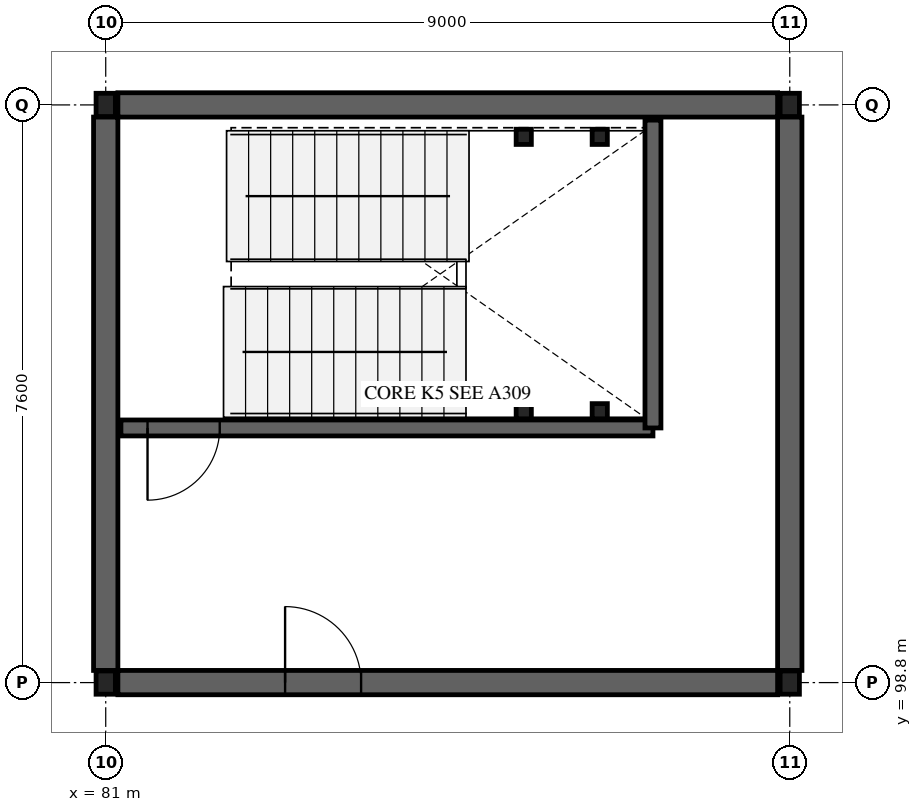
"""IFC4 building model, lengths in metres.
Left out: names, types, materials, properties, quantities, classifications, styles, units other than length and angle.
Written with IfcOpenShell. Run it as: python <this file> out.ifc"""

import sys

from ifc_helpers import new_model, si_unit, direction, frame, frame_2d, origin, origin_2d, place, context, subcontext, project, spatial, rectangle, hollow_rectangle, i_section, extrude, element, fill, save


model = new_model("IFC4")
c1 = context("Model", 3, precision=1e-05, world=origin(), true_north=direction((0.0, 1.0)))
c2 = subcontext(c1, "Body", "Model", "MODEL_VIEW")
j1 = project(units=[si_unit("LENGTHUNIT", "METRE"), si_unit("PLANEANGLEUNIT", "RADIAN")], contexts=[c1])
p1 = place(None, origin())
s1 = spatial("IfcSite", under=j1, at=p1, CompositionType="ELEMENT")
p2 = place(p1, origin())
s2 = spatial("IfcBuilding", under=s1, at=p2, CompositionType="ELEMENT")
p3 = place(p2, frame((0.0, 0.0, 5.04)))
s3 = spatial("IfcBuildingStorey", under=s2, at=p3, CompositionType="ELEMENT", Elevation=5.04)
for number, where, z_axis, x_axis in (
    (1, (81.0, 98.8, 0.0), (0.0, 0.0, 1.0), (1.0, 0.0, 0.0)),
    (2, (81.0, 106.4, 0.0), (0.0, 0.0, 1.0), (1.0, 0.0, 0.0)),
    (3, (90.0, 98.8, 0.0), (0.0, 0.0, 1.0), (1.0, 0.0, 0.0)),
    (4, (90.0, 106.4, 0.0), (0.0, 0.0, 1.0), (1.0, 0.0, 0.0)),
):
    element("IfcColumn", number, at=place(p3, frame(where, z_axis=z_axis, x_axis=x_axis)), inside=s3, PredefinedType="COLUMN", context=c2, shape_type="SweptSolid", body=[
        extrude(i_section(OverallWidth=0.254, OverallDepth=0.306, WebThickness=0.009, FlangeThickness=0.015, FilletRadius=0.015, at=origin_2d()), origin(), (0.0, 0.0, 1.0), 4.32),
    ])
p4 = place(p3, frame((81.16, 98.8, 0.0), z_axis=(0.0, 0.0, 1.0), x_axis=(1.0, 0.0, 0.0)))
e5 = element("IfcWall", 5, at=p4, inside=s3, PredefinedType="SHEAR", context=c2, shape_type="SweptSolid", body=[
    extrude(rectangle(XDim=8.68, YDim=0.32, at=frame_2d((4.34, 0.0))), origin(), (0.0, 0.0, 1.0), 4.04),
])
p5 = place(p4, frame((2.2, 0.0, 0.0)))
e6 = element("IfcOpeningElement", 6, at=p5, cuts=e5, PredefinedType="OPENING", context=c2, shape_type="SweptSolid", body=[
    extrude(rectangle(XDim=1.0, YDim=2.15, at=frame_2d((0.5, 1.075))), frame((0.0, 0.17, 0.0), z_axis=(0.0, -1.0, 0.0), x_axis=(1.0, 0.0, 0.0)), (0.0, 0.0, 1.0), 0.34),
])
p6 = place(p3, frame((81.16, 106.4, 0.0), z_axis=(0.0, 0.0, 1.0), x_axis=(1.0, 0.0, 0.0)))
e7 = element("IfcWall", 7, at=p6, inside=s3, PredefinedType="SHEAR", context=c2, shape_type="SweptSolid", body=[
    extrude(rectangle(XDim=8.68, YDim=0.32, at=frame_2d((4.34, 0.0))), origin(), (0.0, 0.0, 1.0), 4.04),
])
for number, where, z_axis, x_axis in (
    (8, (81.0, 98.96, 0.0), (0.0, 0.0, 1.0), (0.0, 1.0, 0.0)),
    (9, (90.0, 98.96, 0.0), (0.0, 0.0, 1.0), (0.0, 1.0, 0.0)),
):
    element("IfcWall", number, at=place(p3, frame(where, z_axis=z_axis, x_axis=x_axis)), inside=s3, PredefinedType="SHEAR", context=c2, shape_type="SweptSolid", body=[
        extrude(rectangle(XDim=7.28, YDim=0.32, at=frame_2d((3.64, 0.0))), origin(), (0.0, 0.0, 1.0), 4.04),
    ])
p7 = place(p3, frame((81.2, 102.15, 0.0), z_axis=(0.0, 0.0, 1.0), x_axis=(1.0, 0.0, 0.0)))
e10 = element("IfcWall", 10, at=p7, inside=s3, PredefinedType="SOLIDWALL", context=c2, shape_type="SweptSolid", body=[
    extrude(rectangle(XDim=7.0, YDim=0.21, at=frame_2d((3.5, 0.0))), origin(), (0.0, 0.0, 1.0), 4.04),
])
p8 = place(p7, frame((0.35, 0.0, 0.0)))
e11 = element("IfcOpeningElement", 11, at=p8, cuts=e10, PredefinedType="OPENING", context=c2, shape_type="SweptSolid", body=[
    extrude(rectangle(XDim=0.95, YDim=2.12, at=frame_2d((0.475, 1.06))), frame((0.0, 0.115, 0.0), z_axis=(0.0, -1.0, 0.0), x_axis=(1.0, 0.0, 0.0)), (0.0, 0.0, 1.0), 0.23),
])
p9 = place(p3, frame((88.2, 102.15, 0.0), z_axis=(0.0, 0.0, 1.0), x_axis=(0.0, 1.0, 0.0)))
e12 = element("IfcWall", 12, at=p9, inside=s3, PredefinedType="SOLIDWALL", context=c2, shape_type="SweptSolid", body=[
    extrude(rectangle(XDim=4.05, YDim=0.21, at=frame_2d((2.025, 0.0))), origin(), (0.0, 0.0, 1.0), 4.04),
])
for number, where, z_axis, x_axis in (
    (13, (86.5, 102.37, 0.0), (0.0, 0.0, 1.0), (1.0, 0.0, 0.0)),
    (14, (86.5, 105.98, 0.0), (0.0, 0.0, 1.0), (1.0, 0.0, 0.0)),
    (15, (87.5, 102.37, 0.0), (0.0, 0.0, 1.0), (1.0, 0.0, 0.0)),
    (16, (87.5, 105.98, 0.0), (0.0, 0.0, 1.0), (1.0, 0.0, 0.0)),
):
    element("IfcColumn", number, at=place(p3, frame(where, z_axis=z_axis, x_axis=x_axis)), inside=s3, PredefinedType="COLUMN", context=c2, shape_type="SweptSolid", body=[
        extrude(hollow_rectangle(XDim=0.2, YDim=0.2, WallThickness=0.012, at=origin_2d()), origin(), (0.0, 0.0, 1.0), 4.32),
    ])
p10 = place(p8, origin())
e17 = element("IfcDoor", 17, at=p10, inside=s3, OperationType="SINGLE_SWING_RIGHT", PredefinedType="DOOR", context=c2, shape_type="SweptSolid", body=[
    extrude(rectangle(XDim=0.95, YDim=2.12, at=frame_2d((0.475, 1.06))), frame((0.0, 0.025, 0.0), z_axis=(0.0, -1.0, 0.0), x_axis=(1.0, 0.0, 0.0)), (0.0, 0.0, 1.0), 0.05),
])
fill(e11, e17)
p11 = place(p5, origin())
e18 = element("IfcDoor", 18, at=p11, inside=s3, OperationType="SINGLE_SWING_LEFT", PredefinedType="DOOR", context=c2, shape_type="SweptSolid", body=[
    extrude(rectangle(XDim=1.0, YDim=2.15, at=frame_2d((0.5, 1.075))), frame((0.0, 0.025, 0.0), z_axis=(0.0, -1.0, 0.0), x_axis=(1.0, 0.0, 0.0)), (0.0, 0.0, 1.0), 0.05),
])
fill(e6, e18)
save(model, sys.argv[1])
